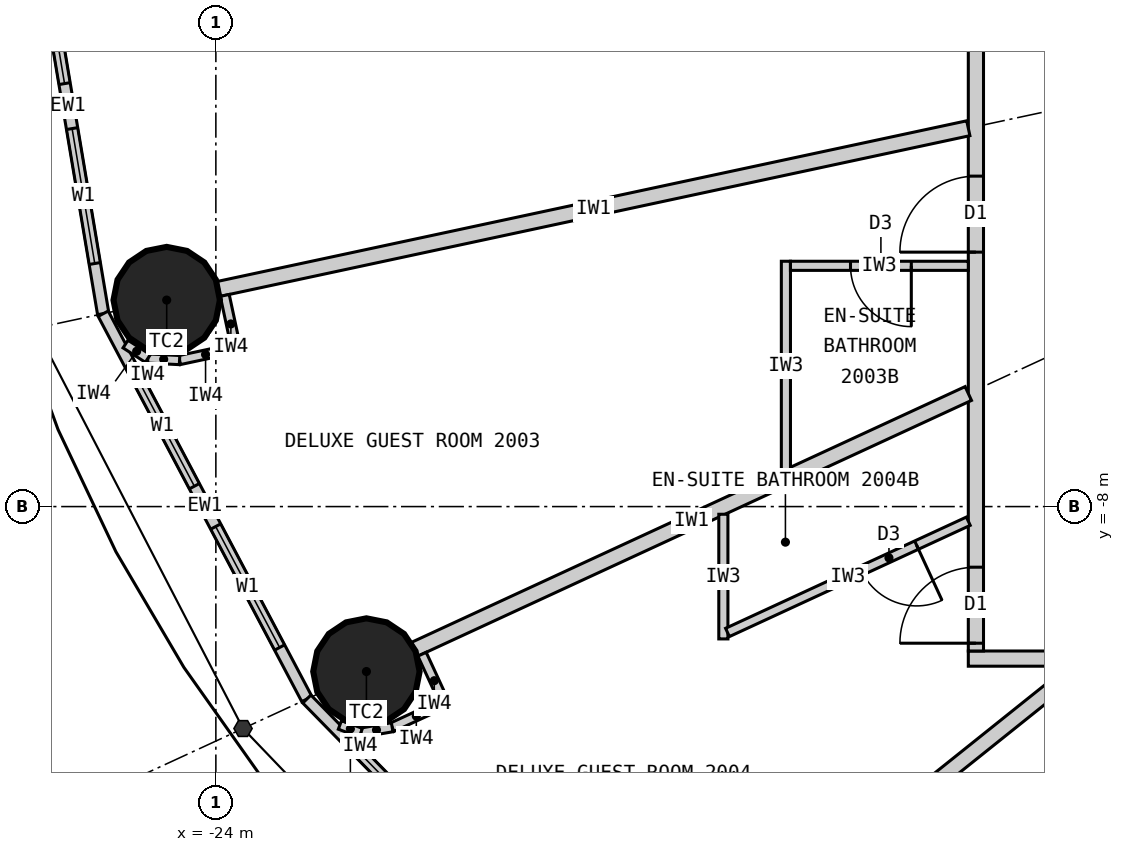
"""IFC4 building model, lengths in metres.
Left out: names, types, materials, properties, quantities, classifications, styles, units other than length and angle.
Written with IfcOpenShell. Run it as: python <this file> out.ifc"""

import sys

from ifc_helpers import new_model, si_unit, direction, frame, frame_2d, origin, origin_2d, place, context, subcontext, project, spatial, rectangle, circle, extrude, element, fill, save


model = new_model("IFC4")
c1 = context("Model", 3, precision=1e-05, world=origin(), true_north=direction((0.0, 1.0)))
c2 = subcontext(c1, "Body", "Model", "MODEL_VIEW")
j1 = project(units=[si_unit("LENGTHUNIT", "METRE"), si_unit("PLANEANGLEUNIT", "RADIAN")], contexts=[c1])
p1 = place(None, origin())
s1 = spatial("IfcSite", under=j1, at=p1, CompositionType="ELEMENT")
p2 = place(p1, origin())
s2 = spatial("IfcBuilding", under=s1, at=p2, CompositionType="ELEMENT")
p3 = place(p2, frame((0.0, 0.0, 80.4)))
s3 = spatial("IfcBuildingStorey", under=s2, at=p3, CompositionType="ELEMENT", Elevation=80.4)
for number, where, z_axis, x_axis in (
    (1, (-24.647, -5.283, 0.0), (0.0, 0.0, 1.0), (1.0, 0.0, 0.0)),
    (2, (-22.019, -10.17, 0.0), (0.0, 0.0, 1.0), (1.0, 0.0, 0.0)),
):
    element("IfcColumn", number, at=place(p3, frame(where, z_axis=z_axis, x_axis=x_axis)), inside=s3, PredefinedType="COLUMN", context=c2, shape_type="SweptSolid", body=[
        extrude(circle(Radius=0.7, at=origin_2d()), origin(), (0.0, 0.0, 1.0), 3.3),
    ])
p4 = place(p3, frame((-26.4, 0.0, 0.0), z_axis=(0.0, 0.0, 1.0), x_axis=(0.165642551694, -0.986185857264, 0.0)))
e3 = element("IfcWall", 3, at=p4, inside=s3, PredefinedType="ELEMENTEDWALL", context=c2, shape_type="SweptSolid", body=[
    extrude(rectangle(XDim=5.539, YDim=0.15, at=frame_2d((2.77, 0.0))), origin(), (0.0, 0.0, 1.0), 3.12),
])
p5 = place(p4, frame((0.669, 0.0, 0.9)))
e4 = element("IfcOpeningElement", 4, at=p5, cuts=e3, PredefinedType="OPENING", context=c2, shape_type="SweptSolid", body=[
    extrude(rectangle(XDim=1.8, YDim=1.9, at=frame_2d((0.9, 0.95))), frame((0.0, 0.085, 0.0), z_axis=(0.0, -1.0, 0.0), x_axis=(1.0, 0.0, 0.0)), (0.0, 0.0, 1.0), 0.17),
])
p6 = place(p4, frame((3.07, 0.0, 0.9)))
e5 = element("IfcOpeningElement", 5, at=p6, cuts=e3, PredefinedType="OPENING", context=c2, shape_type="SweptSolid", body=[
    extrude(rectangle(XDim=1.8, YDim=1.9, at=frame_2d((0.9, 0.95))), frame((0.0, 0.085, 0.0), z_axis=(0.0, -1.0, 0.0), x_axis=(1.0, 0.0, 0.0)), (0.0, 0.0, 1.0), 0.17),
])
p7 = place(p3, frame((-25.482, -5.462, 0.0), z_axis=(0.0, 0.0, 1.0), x_axis=(0.467296867008, -0.884100468321, 0.0)))
e6 = element("IfcWall", 6, at=p7, inside=s3, PredefinedType="ELEMENTEDWALL", context=c2, shape_type="SweptSolid", body=[
    extrude(rectangle(XDim=5.734, YDim=0.15, at=frame_2d((2.867, 0.0))), origin(), (0.0, 0.0, 1.0), 3.12),
])
p8 = place(p7, frame((0.767, 0.0, 0.9)))
e7 = element("IfcOpeningElement", 7, at=p8, cuts=e6, PredefinedType="OPENING", context=c2, shape_type="SweptSolid", body=[
    extrude(rectangle(XDim=1.8, YDim=1.9, at=frame_2d((0.9, 0.95))), frame((0.0, 0.085, 0.0), z_axis=(0.0, -1.0, 0.0), x_axis=(1.0, 0.0, 0.0)), (0.0, 0.0, 1.0), 0.17),
])
p9 = place(p7, frame((3.167, 0.0, 0.9)))
e8 = element("IfcOpeningElement", 8, at=p9, cuts=e6, PredefinedType="OPENING", context=c2, shape_type="SweptSolid", body=[
    extrude(rectangle(XDim=1.8, YDim=1.9, at=frame_2d((0.9, 0.95))), frame((0.0, 0.085, 0.0), z_axis=(0.0, -1.0, 0.0), x_axis=(1.0, 0.0, 0.0)), (0.0, 0.0, 1.0), 0.17),
])
p10 = place(p3, frame((-22.803, -10.532, 0.0), z_axis=(0.0, 0.0, 1.0), x_axis=(0.699602905915, -0.714531856557, 0.0)))
e9 = element("IfcWall", 9, at=p10, inside=s3, PredefinedType="ELEMENTEDWALL", context=c2, shape_type="SweptSolid", body=[
    extrude(rectangle(XDim=6.051, YDim=0.15, at=frame_2d((3.025, 0.0))), origin(), (0.0, 0.0, 1.0), 3.12),
])
p11 = place(p10, frame((0.926, 0.0, 0.9)))
e10 = element("IfcOpeningElement", 10, at=p11, cuts=e9, PredefinedType="OPENING", context=c2, shape_type="SweptSolid", body=[
    extrude(rectangle(XDim=1.8, YDim=1.9, at=frame_2d((0.9, 0.95))), frame((0.0, 0.085, 0.0), z_axis=(0.0, -1.0, 0.0), x_axis=(1.0, 0.0, 0.0)), (0.0, 0.0, 1.0), 0.17),
])
p12 = place(p10, frame((3.325, 0.0, 0.9)))
e11 = element("IfcOpeningElement", 11, at=p12, cuts=e9, PredefinedType="OPENING", context=c2, shape_type="SweptSolid", body=[
    extrude(rectangle(XDim=1.8, YDim=1.9, at=frame_2d((0.9, 0.95))), frame((0.0, 0.085, 0.0), z_axis=(0.0, -1.0, 0.0), x_axis=(1.0, 0.0, 0.0)), (0.0, 0.0, 1.0), 0.17),
])
p13 = place(p3, frame((14.1, -10.0, 0.0), z_axis=(0.0, 0.0, 1.0), x_axis=(-1.0, 0.0, 0.0)))
e12 = element("IfcWall", 12, at=p13, inside=s3, PredefinedType="PARTITIONING", context=c2, shape_type="SweptSolid", body=[
    extrude(rectangle(XDim=28.2, YDim=0.2, at=frame_2d((14.1, 0.0))), origin(), (0.0, 0.0, 1.0), 3.12),
])
p14 = place(p13, frame((23.865, 0.0, 0.0)))
e13 = element("IfcOpeningElement", 13, at=p14, cuts=e12, PredefinedType="OPENING", context=c2, shape_type="SweptSolid", body=[
    extrude(rectangle(XDim=1.0, YDim=2.2, at=frame_2d((0.5, 1.1))), frame((0.0, 0.11, 0.0), z_axis=(0.0, -1.0, 0.0), x_axis=(1.0, 0.0, 0.0)), (0.0, 0.0, 1.0), 0.22),
])
p15 = place(p13, frame((18.529, 0.0, 0.0)))
e14 = element("IfcOpeningElement", 14, at=p15, cuts=e12, PredefinedType="OPENING", context=c2, shape_type="SweptSolid", body=[
    extrude(rectangle(XDim=1.0, YDim=2.2, at=frame_2d((0.5, 1.1))), frame((0.0, 0.11, 0.0), z_axis=(0.0, -1.0, 0.0), x_axis=(1.0, 0.0, 0.0)), (0.0, 0.0, 1.0), 0.22),
])
p16 = place(p13, frame((14.923, 0.0, 0.0)))
e15 = element("IfcOpeningElement", 15, at=p16, cuts=e12, PredefinedType="OPENING", context=c2, shape_type="SweptSolid", body=[
    extrude(rectangle(XDim=1.0, YDim=2.2, at=frame_2d((0.5, 1.1))), frame((0.0, 0.11, 0.0), z_axis=(0.0, -1.0, 0.0), x_axis=(1.0, 0.0, 0.0)), (0.0, 0.0, 1.0), 0.22),
])
p17 = place(p13, frame((2.801, 0.0, 0.0)))
e16 = element("IfcOpeningElement", 16, at=p17, cuts=e12, PredefinedType="OPENING", context=c2, shape_type="SweptSolid", body=[
    extrude(rectangle(XDim=1.0, YDim=2.2, at=frame_2d((0.5, 1.1))), frame((0.0, 0.11, 0.0), z_axis=(0.0, -1.0, 0.0), x_axis=(1.0, 0.0, 0.0)), (0.0, 0.0, 1.0), 0.22),
])
p18 = place(p3, frame((-14.0, 9.9, 0.0), z_axis=(0.0, 0.0, 1.0), x_axis=(0.0, -1.0, 0.0)))
e17 = element("IfcWall", 17, at=p18, inside=s3, PredefinedType="PARTITIONING", context=c2, shape_type="SweptSolid", body=[
    extrude(rectangle(XDim=19.8, YDim=0.2, at=frame_2d((9.9, 0.0))), origin(), (0.0, 0.0, 1.0), 3.12),
])
p19 = place(p18, frame((7.097, 0.0, 0.0)))
e18 = element("IfcOpeningElement", 18, at=p19, cuts=e17, PredefinedType="OPENING", context=c2, shape_type="SweptSolid", body=[
    extrude(rectangle(XDim=1.0, YDim=2.2, at=frame_2d((0.5, 1.1))), frame((0.0, 0.11, 0.0), z_axis=(0.0, -1.0, 0.0), x_axis=(1.0, 0.0, 0.0)), (0.0, 0.0, 1.0), 0.22),
])
p20 = place(p18, frame((10.778, 0.0, 0.0)))
e19 = element("IfcOpeningElement", 19, at=p20, cuts=e17, PredefinedType="OPENING", context=c2, shape_type="SweptSolid", body=[
    extrude(rectangle(XDim=1.0, YDim=2.2, at=frame_2d((0.5, 1.1))), frame((0.0, 0.11, 0.0), z_axis=(0.0, -1.0, 0.0), x_axis=(1.0, 0.0, 0.0)), (0.0, 0.0, 1.0), 0.22),
])
p21 = place(p18, frame((13.552, 0.0, 0.0)))
e20 = element("IfcOpeningElement", 20, at=p21, cuts=e17, PredefinedType="OPENING", context=c2, shape_type="SweptSolid", body=[
    extrude(rectangle(XDim=1.0, YDim=2.2, at=frame_2d((0.5, 1.1))), frame((0.0, 0.11, 0.0), z_axis=(0.0, -1.0, 0.0), x_axis=(1.0, 0.0, 0.0)), (0.0, 0.0, 1.0), 0.22),
])
p22 = place(p18, frame((18.698, 0.0, 0.0)))
e21 = element("IfcOpeningElement", 21, at=p22, cuts=e17, PredefinedType="OPENING", context=c2, shape_type="SweptSolid", body=[
    extrude(rectangle(XDim=1.0, YDim=2.2, at=frame_2d((0.5, 1.1))), frame((0.0, 0.11, 0.0), z_axis=(0.0, -1.0, 0.0), x_axis=(1.0, 0.0, 0.0)), (0.0, 0.0, 1.0), 0.22),
])
p23 = place(p18, frame((1.877, 0.0, 0.0)))
e22 = element("IfcOpeningElement", 22, at=p23, cuts=e17, PredefinedType="OPENING", context=c2, shape_type="SweptSolid", body=[
    extrude(rectangle(XDim=1.0, YDim=2.2, at=frame_2d((0.5, 1.1))), frame((0.0, 0.11, 0.0), z_axis=(0.0, -1.0, 0.0), x_axis=(1.0, 0.0, 0.0)), (0.0, 0.0, 1.0), 0.22),
])
p24 = place(p3, frame((-14.1, -3.022, 0.0), z_axis=(0.0, 0.0, 1.0), x_axis=(-0.977790014929, -0.209586943072, 0.0)))
e23 = element("IfcWall", 23, at=p24, inside=s3, PredefinedType="PARTITIONING", context=c2, shape_type="SweptSolid", body=[
    extrude(rectangle(XDim=10.087, YDim=0.2, at=frame_2d((5.043, 0.0))), origin(), (0.0, 0.0, 1.0), 2.32),
])
p25 = place(p3, frame((-14.1, -6.512, 0.0), z_axis=(0.0, 0.0, 1.0), x_axis=(-0.907832871056, -0.419332181247, 0.0)))
e24 = element("IfcWall", 24, at=p25, inside=s3, PredefinedType="PARTITIONING", context=c2, shape_type="SweptSolid", body=[
    extrude(rectangle(XDim=8.023, YDim=0.2, at=frame_2d((4.011, 0.0))), origin(), (0.0, 0.0, 1.0), 2.32),
])
p26 = place(p3, frame((-12.625, -10.1, 0.0), z_axis=(0.0, 0.0, 1.0), x_axis=(-0.780892451574, -0.624665493744, 0.0)))
e25 = element("IfcWall", 25, at=p26, inside=s3, PredefinedType="PARTITIONING", context=c2, shape_type="SweptSolid", body=[
    extrude(rectangle(XDim=6.045, YDim=0.2, at=frame_2d((3.022, 0.0))), origin(), (0.0, 0.0, 1.0), 2.32),
])
p27 = place(p3, frame((-16.5, -7.521, 0.0), z_axis=(0.0, 0.0, 1.0), x_axis=(0.0, 1.0, 0.0)))
e26 = element("IfcWall", 26, at=p27, inside=s3, PredefinedType="PARTITIONING", context=c2, shape_type="SweptSolid", body=[
    extrude(rectangle(XDim=2.749, YDim=0.12, at=frame_2d((1.374, 0.0))), origin(), (0.0, 0.0, 1.0), 3.12),
])
p28 = place(p3, frame((-14.1, -4.833, 0.0), z_axis=(0.0, 0.0, 1.0), x_axis=(-1.0, 0.0, 0.0)))
e27 = element("IfcWall", 27, at=p28, inside=s3, PredefinedType="PARTITIONING", context=c2, shape_type="SweptSolid", body=[
    extrude(rectangle(XDim=2.34, YDim=0.12, at=frame_2d((1.17, 0.0))), origin(), (0.0, 0.0, 1.0), 3.12),
])
p29 = place(p28, frame((0.75, 0.0, 0.0)))
e28 = element("IfcOpeningElement", 28, at=p29, cuts=e27, PredefinedType="OPENING", context=c2, shape_type="SweptSolid", body=[
    extrude(rectangle(XDim=0.8, YDim=2.1, at=frame_2d((0.4, 1.05))), frame((0.0, 0.07, 0.0), z_axis=(0.0, -1.0, 0.0), x_axis=(1.0, 0.0, 0.0)), (0.0, 0.0, 1.0), 0.14),
])
p30 = place(p3, frame((-17.323, -8.101, 0.0), z_axis=(0.0, 0.0, 1.0), x_axis=(0.0, -1.0, 0.0)))
e29 = element("IfcWall", 29, at=p30, inside=s3, PredefinedType="PARTITIONING", context=c2, shape_type="SweptSolid", body=[
    extrude(rectangle(XDim=1.64, YDim=0.12, at=frame_2d((0.82, 0.0))), origin(), (0.0, 0.0, 1.0), 3.12),
])
p31 = place(p3, frame((-14.1, -8.193, 0.0), z_axis=(0.0, 0.0, 1.0), x_axis=(-0.907836493557, -0.419324338628, 0.0)))
e30 = element("IfcWall", 30, at=p31, inside=s3, PredefinedType="PARTITIONING", context=c2, shape_type="SweptSolid", body=[
    extrude(rectangle(XDim=3.49, YDim=0.12, at=frame_2d((1.745, 0.0))), origin(), (0.0, 0.0, 1.0), 3.12),
])
p32 = place(p31, frame((0.75, 0.0, 0.0)))
e31 = element("IfcOpeningElement", 31, at=p32, cuts=e30, PredefinedType="OPENING", context=c2, shape_type="SweptSolid", body=[
    extrude(rectangle(XDim=0.8, YDim=2.1, at=frame_2d((0.4, 1.05))), frame((0.0, 0.07, 0.0), z_axis=(0.0, -1.0, 0.0), x_axis=(1.0, 0.0, 0.0)), (0.0, 0.0, 1.0), 0.14),
])
p33 = place(p3, frame((-23.883, -5.222, 0.0), z_axis=(0.0, 0.0, 1.0), x_axis=(0.209311842415, -0.977848941619, 0.0)))
e32 = element("IfcWall", 32, at=p33, inside=s3, PredefinedType="PARTITIONING", context=c2, shape_type="SweptSolid", body=[
    extrude(rectangle(XDim=0.768, YDim=0.12, at=frame_2d((0.384, 0.0))), origin(), (0.0, 0.0, 1.0), 3.12),
])
p34 = place(p3, frame((-23.793, -5.926, 0.0), z_axis=(0.0, 0.0, 1.0), x_axis=(-0.977792206673, -0.209576717621, 0.0)))
e33 = element("IfcWall", 33, at=p34, inside=s3, PredefinedType="PARTITIONING", context=c2, shape_type="SweptSolid", body=[
    extrude(rectangle(XDim=0.7, YDim=0.12, at=frame_2d((0.35, 0.0))), origin(), (0.0, 0.0, 1.0), 3.12),
])
p35 = place(p3, frame((-24.478, -6.073, 0.0), z_axis=(0.0, 0.0, 1.0), x_axis=(-0.998708262812, 0.05081147302, 0.0)))
e34 = element("IfcWall", 34, at=p35, inside=s3, PredefinedType="PARTITIONING", context=c2, shape_type="SweptSolid", body=[
    extrude(rectangle(XDim=0.418, YDim=0.12, at=frame_2d((0.209, 0.0))), origin(), (0.0, 0.0, 1.0), 3.12),
])
p36 = place(p3, frame((-24.895, -6.052, 0.0), z_axis=(0.0, 0.0, 1.0), x_axis=(-0.839495197275, 0.54336710772, 0.0)))
e35 = element("IfcWall", 35, at=p36, inside=s3, PredefinedType="PARTITIONING", context=c2, shape_type="SweptSolid", body=[
    extrude(rectangle(XDim=0.35, YDim=0.12, at=frame_2d((0.175, 0.0))), origin(), (0.0, 0.0, 1.0), 3.12),
])
p37 = place(p3, frame((-21.287, -9.942, 0.0), z_axis=(0.0, 0.0, 1.0), x_axis=(0.419259891039, -0.907866258744, 0.0)))
e36 = element("IfcWall", 36, at=p37, inside=s3, PredefinedType="PARTITIONING", context=c2, shape_type="SweptSolid", body=[
    extrude(rectangle(XDim=0.768, YDim=0.12, at=frame_2d((0.384, 0.0))), origin(), (0.0, 0.0, 1.0), 3.12),
])
p38 = place(p3, frame((-21.045, -10.61, 0.0), z_axis=(0.0, 0.0, 1.0), x_axis=(-0.907877701396, -0.419235112208, 0.0)))
e37 = element("IfcWall", 37, at=p38, inside=s3, PredefinedType="PARTITIONING", context=c2, shape_type="SweptSolid", body=[
    extrude(rectangle(XDim=0.7, YDim=0.12, at=frame_2d((0.35, 0.0))), origin(), (0.0, 0.0, 1.0), 3.12),
])
p39 = place(p3, frame((-21.68, -10.903, 0.0), z_axis=(0.0, 0.0, 1.0), x_axis=(-0.985446622073, -0.169985161247, 0.0)))
e38 = element("IfcWall", 38, at=p39, inside=s3, PredefinedType="PARTITIONING", context=c2, shape_type="SweptSolid", body=[
    extrude(rectangle(XDim=0.418, YDim=0.12, at=frame_2d((0.209, 0.0))), origin(), (0.0, 0.0, 1.0), 3.12),
])
p40 = place(p3, frame((-22.092, -10.974, 0.0), z_axis=(0.0, 0.0, 1.0), x_axis=(-0.938428160676, 0.345474437912, 0.0)))
e39 = element("IfcWall", 39, at=p40, inside=s3, PredefinedType="PARTITIONING", context=c2, shape_type="SweptSolid", body=[
    extrude(rectangle(XDim=0.294, YDim=0.12, at=frame_2d((0.147, 0.0))), origin(), (0.0, 0.0, 1.0), 3.12),
])
p41 = place(p5, origin())
e40 = element("IfcWindow", 40, at=p41, inside=s3, PartitioningType="SINGLE_PANEL", PredefinedType="WINDOW", context=c2, shape_type="SweptSolid", body=[
    extrude(rectangle(XDim=1.8, YDim=1.9, at=frame_2d((0.9, 0.95))), frame((0.0, 0.03, 0.0), z_axis=(0.0, -1.0, 0.0), x_axis=(1.0, 0.0, 0.0)), (0.0, 0.0, 1.0), 0.06),
])
fill(e4, e40)
p42 = place(p6, origin())
e41 = element("IfcWindow", 41, at=p42, inside=s3, PartitioningType="SINGLE_PANEL", PredefinedType="WINDOW", context=c2, shape_type="SweptSolid", body=[
    extrude(rectangle(XDim=1.8, YDim=1.9, at=frame_2d((0.9, 0.95))), frame((0.0, 0.03, 0.0), z_axis=(0.0, -1.0, 0.0), x_axis=(1.0, 0.0, 0.0)), (0.0, 0.0, 1.0), 0.06),
])
fill(e5, e41)
p43 = place(p8, origin())
e42 = element("IfcWindow", 42, at=p43, inside=s3, PartitioningType="SINGLE_PANEL", PredefinedType="WINDOW", context=c2, shape_type="SweptSolid", body=[
    extrude(rectangle(XDim=1.8, YDim=1.9, at=frame_2d((0.9, 0.95))), frame((0.0, 0.03, 0.0), z_axis=(0.0, -1.0, 0.0), x_axis=(1.0, 0.0, 0.0)), (0.0, 0.0, 1.0), 0.06),
])
fill(e7, e42)
p44 = place(p9, origin())
e43 = element("IfcWindow", 43, at=p44, inside=s3, PartitioningType="SINGLE_PANEL", PredefinedType="WINDOW", context=c2, shape_type="SweptSolid", body=[
    extrude(rectangle(XDim=1.8, YDim=1.9, at=frame_2d((0.9, 0.95))), frame((0.0, 0.03, 0.0), z_axis=(0.0, -1.0, 0.0), x_axis=(1.0, 0.0, 0.0)), (0.0, 0.0, 1.0), 0.06),
])
fill(e8, e43)
p45 = place(p11, origin())
e44 = element("IfcWindow", 44, at=p45, inside=s3, PartitioningType="SINGLE_PANEL", PredefinedType="WINDOW", context=c2, shape_type="SweptSolid", body=[
    extrude(rectangle(XDim=1.8, YDim=1.9, at=frame_2d((0.9, 0.95))), frame((0.0, 0.03, 0.0), z_axis=(0.0, -1.0, 0.0), x_axis=(1.0, 0.0, 0.0)), (0.0, 0.0, 1.0), 0.06),
])
fill(e10, e44)
p46 = place(p29, origin())
e45 = element("IfcDoor", 45, at=p46, inside=s3, OperationType="SINGLE_SWING_LEFT", PredefinedType="DOOR", context=c2, shape_type="SweptSolid", body=[
    extrude(rectangle(XDim=0.8, YDim=2.1, at=frame_2d((0.4, 1.05))), frame((0.0, 0.025, 0.0), z_axis=(0.0, -1.0, 0.0), x_axis=(1.0, 0.0, 0.0)), (0.0, 0.0, 1.0), 0.05),
])
fill(e28, e45)
p47 = place(p21, origin())
e46 = element("IfcDoor", 46, at=p47, inside=s3, OperationType="SINGLE_SWING_RIGHT", PredefinedType="DOOR", context=c2, shape_type="SweptSolid", body=[
    extrude(rectangle(XDim=1.0, YDim=2.2, at=frame_2d((0.5, 1.1))), frame((0.0, 0.025, 0.0), z_axis=(0.0, -1.0, 0.0), x_axis=(1.0, 0.0, 0.0)), (0.0, 0.0, 1.0), 0.05),
])
fill(e20, e46)
p48 = place(p32, origin())
e47 = element("IfcDoor", 47, at=p48, inside=s3, OperationType="SINGLE_SWING_LEFT", PredefinedType="DOOR", context=c2, shape_type="SweptSolid", body=[
    extrude(rectangle(XDim=0.8, YDim=2.1, at=frame_2d((0.4, 1.05))), frame((0.0, 0.025, 0.0), z_axis=(0.0, -1.0, 0.0), x_axis=(1.0, 0.0, 0.0)), (0.0, 0.0, 1.0), 0.05),
])
fill(e31, e47)
p49 = place(p22, origin())
e48 = element("IfcDoor", 48, at=p49, inside=s3, OperationType="SINGLE_SWING_RIGHT", PredefinedType="DOOR", context=c2, shape_type="SweptSolid", body=[
    extrude(rectangle(XDim=1.0, YDim=2.2, at=frame_2d((0.5, 1.1))), frame((0.0, 0.025, 0.0), z_axis=(0.0, -1.0, 0.0), x_axis=(1.0, 0.0, 0.0)), (0.0, 0.0, 1.0), 0.05),
])
fill(e21, e48)
save(model, sys.argv[1])
